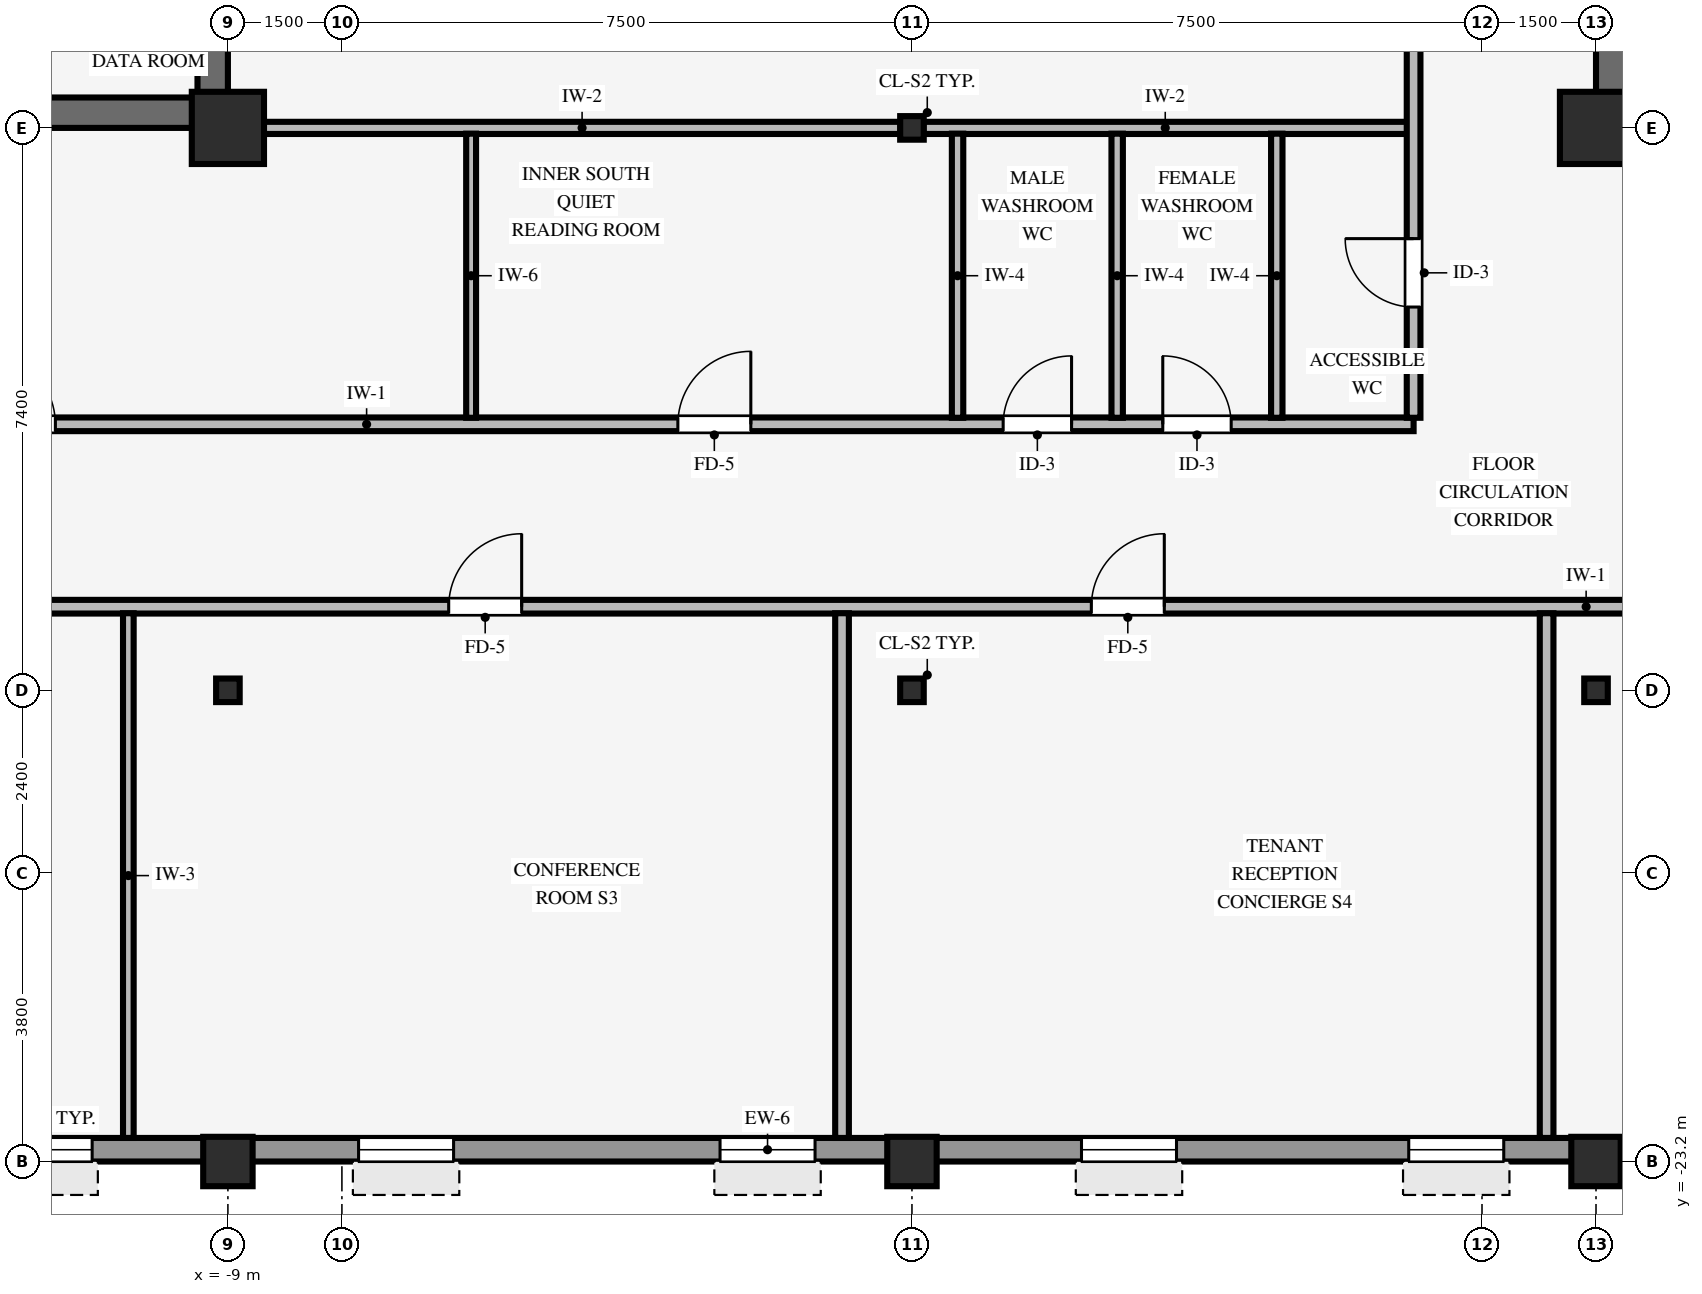
"""IFC4 building model, lengths in metres.
Left out: names, types, materials, properties, quantities, classifications, styles, units other than length and angle.
Written with IfcOpenShell. Run it as: python <this file> out.ifc"""

import sys

from ifc_helpers import new_model, si_unit, direction, frame, frame_2d, origin, origin_2d, place, context, subcontext, project, spatial, rectangle, hollow_rectangle, i_section, extrude, source, transform, mapped, element, fill, save


model = new_model("IFC4")
c1 = context("Model", 3, precision=1e-05, world=origin(), true_north=direction((0.0, 1.0)))
c2 = subcontext(c1, "Body", "Model", "MODEL_VIEW")
j1 = project(units=[si_unit("LENGTHUNIT", "METRE"), si_unit("PLANEANGLEUNIT", "RADIAN")], contexts=[c1])
p1 = place(None, origin())
s1 = spatial("IfcSite", under=j1, at=p1, CompositionType="ELEMENT")
p2 = place(p1, origin())
s2 = spatial("IfcBuilding", under=s1, at=p2, CompositionType="ELEMENT")
p3 = place(p2, frame((0.0, 0.0, 178.6)))
s3 = spatial("IfcBuildingStorey", under=s2, at=p3, CompositionType="ELEMENT", Elevation=178.6)
p4 = place(p3, frame((-17.5, -9.4, 0.0), z_axis=(0.0, 0.0, 1.0), x_axis=(1.0, 0.0, 0.0)))
e1 = element("IfcWall", 1, at=p4, inside=s3, PredefinedType="SHEAR", context=c2, shape_type="SweptSolid", body=[
    extrude(rectangle(XDim=8.5, YDim=0.4, at=frame_2d((4.25, 0.0))), origin(), (0.0, 0.0, 1.0), 3.37),
])
p5 = place(p3, frame((-9.2, -9.205, 0.0), z_axis=(0.0, 0.0, 1.0), x_axis=(0.0, 1.0, 0.0)))
e2 = element("IfcWall", 2, at=p5, inside=s3, PredefinedType="SHEAR", context=c2, shape_type="SweptSolid", body=[
    extrude(rectangle(XDim=18.41, YDim=0.4, at=frame_2d((9.205, 0.0))), origin(), (0.0, 0.0, 1.0), 3.37),
])
p6 = place(p5, frame((8.605, 0.0, 0.0)))
e3 = element("IfcOpeningElement", 3, at=p6, cuts=e2, PredefinedType="OPENING", context=c2, shape_type="SweptSolid", body=[
    extrude(rectangle(XDim=1.2, YDim=2.15, at=frame_2d((0.6, 1.075))), frame((0.0, 0.21, 0.0), z_axis=(0.0, -1.0, 0.0), x_axis=(1.0, 0.0, 0.0)), (0.0, 0.0, 1.0), 0.42),
])
p7 = place(p3, frame((9.0, -9.4, 0.0), z_axis=(0.0, 0.0, 1.0), x_axis=(1.0, 0.0, 0.0)))
e4 = element("IfcWall", 4, at=p7, inside=s3, PredefinedType="SHEAR", context=c2, shape_type="SweptSolid", body=[
    extrude(rectangle(XDim=8.5, YDim=0.4, at=frame_2d((4.25, 0.0))), origin(), (0.0, 0.0, 1.0), 3.37),
])
p8 = place(p3, frame((9.2, -9.205, 0.0), z_axis=(0.0, 0.0, 1.0), x_axis=(0.0, 1.0, 0.0)))
e5 = element("IfcWall", 5, at=p8, inside=s3, PredefinedType="SHEAR", context=c2, shape_type="SweptSolid", body=[
    extrude(rectangle(XDim=18.41, YDim=0.4, at=frame_2d((9.205, 0.0))), origin(), (0.0, 0.0, 1.0), 3.37),
])
p9 = place(p8, frame((8.605, 0.0, 0.0)))
e6 = element("IfcOpeningElement", 6, at=p9, cuts=e5, PredefinedType="OPENING", context=c2, shape_type="SweptSolid", body=[
    extrude(rectangle(XDim=1.2, YDim=2.15, at=frame_2d((0.6, 1.075))), frame((0.0, 0.21, 0.0), z_axis=(0.0, -1.0, 0.0), x_axis=(1.0, 0.0, 0.0)), (0.0, 0.0, 1.0), 0.42),
])
for number, where, z_axis, x_axis in (
    (7, (-9.0, -9.6, 0.0), (0.0, 0.0, 1.0), (1.0, 0.0, 0.0)),
    (8, (9.0, -9.6, 0.0), (0.0, 0.0, 1.0), (1.0, 0.0, 0.0)),
):
    element("IfcColumn", number, at=place(p3, frame(where, z_axis=z_axis, x_axis=x_axis)), inside=s3, PredefinedType="COLUMN", context=c2, shape_type="SweptSolid", body=[
        extrude(rectangle(XDim=0.95, YDim=0.95, at=origin_2d()), origin(), (0.0, 0.0, 1.0), 3.37),
    ])
for number, where, z_axis, x_axis in (
    (9, (-9.0, -23.2, 0.0), (0.0, 0.0, 1.0), (1.0, 0.0, 0.0)),
    (10, (0.0, -23.2, 0.0), (0.0, 0.0, 1.0), (1.0, 0.0, 0.0)),
    (11, (9.0, -23.2, 0.0), (0.0, 0.0, 1.0), (1.0, 0.0, 0.0)),
):
    element("IfcColumn", number, at=place(p3, frame(where, z_axis=z_axis, x_axis=x_axis)), inside=s3, PredefinedType="COLUMN", context=c2, shape_type="SweptSolid", body=[
        extrude(hollow_rectangle(XDim=0.65, YDim=0.65, WallThickness=0.04, InnerFilletRadius=0.04, OuterFilletRadius=0.08, at=origin_2d()), origin(), (0.0, 0.0, 1.0), 3.37),
    ])
for number, where, z_axis, x_axis in (
    (12, (0.0, -17.0, 0.0), (0.0, 0.0, 1.0), (1.0, 0.0, 0.0)),
    (13, (0.0, -9.6, 0.0), (0.0, 0.0, 1.0), (1.0, 0.0, 0.0)),
    (14, (-9.0, -17.0, 0.0), (0.0, 0.0, 1.0), (1.0, 0.0, 0.0)),
    (15, (9.0, -17.0, 0.0), (0.0, 0.0, 1.0), (1.0, 0.0, 0.0)),
):
    element("IfcColumn", number, at=place(p3, frame(where, z_axis=z_axis, x_axis=x_axis)), inside=s3, PredefinedType="COLUMN", context=c2, shape_type="SweptSolid", body=[
        extrude(i_section(OverallWidth=0.31, OverallDepth=0.31, WebThickness=0.015, FlangeThickness=0.015, FilletRadius=0.015, at=origin_2d()), origin(), (0.0, 0.0, 1.0), 3.37),
    ])
p10 = place(p3, frame((-24.3, -23.045, 0.0), z_axis=(0.0, 0.0, 1.0), x_axis=(1.0, 0.0, 0.0)))
e16 = element("IfcWall", 16, at=p10, inside=s3, PredefinedType="STANDARD", context=c2, shape_type="SweptSolid", body=[
    extrude(rectangle(XDim=44.8, YDim=0.31, at=frame_2d((22.4, 0.0))), origin(), (0.0, 0.0, 1.0), 2.705),
])
p11 = place(p10, frame((2.753, 0.0, 0.8)))
e17 = element("IfcOpeningElement", 17, at=p11, cuts=e16, PredefinedType="OPENING", context=c2, shape_type="SweptSolid", body=[
    extrude(rectangle(XDim=1.25, YDim=1.52, at=frame_2d((0.625, 0.76))), frame((0.0, 0.165, 0.0), z_axis=(0.0, -1.0, 0.0), x_axis=(1.0, 0.0, 0.0)), (0.0, 0.0, 1.0), 0.33),
])
p12 = place(p10, frame((7.508, 0.0, 0.8)))
e18 = element("IfcOpeningElement", 18, at=p12, cuts=e16, PredefinedType="OPENING", context=c2, shape_type="SweptSolid", body=[
    extrude(rectangle(XDim=1.25, YDim=1.52, at=frame_2d((0.625, 0.76))), frame((0.0, 0.165, 0.0), z_axis=(0.0, -1.0, 0.0), x_axis=(1.0, 0.0, 0.0)), (0.0, 0.0, 1.0), 0.33),
])
p13 = place(p10, frame((12.264, 0.0, 0.8)))
e19 = element("IfcOpeningElement", 19, at=p13, cuts=e16, PredefinedType="OPENING", context=c2, shape_type="SweptSolid", body=[
    extrude(rectangle(XDim=1.25, YDim=1.52, at=frame_2d((0.625, 0.76))), frame((0.0, 0.165, 0.0), z_axis=(0.0, -1.0, 0.0), x_axis=(1.0, 0.0, 0.0)), (0.0, 0.0, 1.0), 0.33),
])
p14 = place(p10, frame((17.019, 0.0, 0.8)))
e20 = element("IfcOpeningElement", 20, at=p14, cuts=e16, PredefinedType="OPENING", context=c2, shape_type="SweptSolid", body=[
    extrude(rectangle(XDim=1.25, YDim=1.52, at=frame_2d((0.625, 0.76))), frame((0.0, 0.165, 0.0), z_axis=(0.0, -1.0, 0.0), x_axis=(1.0, 0.0, 0.0)), (0.0, 0.0, 1.0), 0.33),
])
p15 = place(p10, frame((21.775, 0.0, 0.8)))
e21 = element("IfcOpeningElement", 21, at=p15, cuts=e16, PredefinedType="OPENING", context=c2, shape_type="SweptSolid", body=[
    extrude(rectangle(XDim=1.25, YDim=1.52, at=frame_2d((0.625, 0.76))), frame((0.0, 0.165, 0.0), z_axis=(0.0, -1.0, 0.0), x_axis=(1.0, 0.0, 0.0)), (0.0, 0.0, 1.0), 0.33),
])
p16 = place(p10, frame((26.531, 0.0, 0.8)))
e22 = element("IfcOpeningElement", 22, at=p16, cuts=e16, PredefinedType="OPENING", context=c2, shape_type="SweptSolid", body=[
    extrude(rectangle(XDim=1.25, YDim=1.52, at=frame_2d((0.625, 0.76))), frame((0.0, 0.165, 0.0), z_axis=(0.0, -1.0, 0.0), x_axis=(1.0, 0.0, 0.0)), (0.0, 0.0, 1.0), 0.33),
])
p17 = place(p10, frame((30.836, 0.0, 0.8)))
e23 = element("IfcOpeningElement", 23, at=p17, cuts=e16, PredefinedType="OPENING", context=c2, shape_type="SweptSolid", body=[
    extrude(rectangle(XDim=1.25, YDim=1.52, at=frame_2d((0.625, 0.76))), frame((0.0, 0.165, 0.0), z_axis=(0.0, -1.0, 0.0), x_axis=(1.0, 0.0, 0.0)), (0.0, 0.0, 1.0), 0.33),
])
p18 = place(p10, frame((36.042, 0.0, 0.8)))
e24 = element("IfcOpeningElement", 24, at=p18, cuts=e16, PredefinedType="OPENING", context=c2, shape_type="SweptSolid", body=[
    extrude(rectangle(XDim=1.25, YDim=1.52, at=frame_2d((0.625, 0.76))), frame((0.0, 0.165, 0.0), z_axis=(0.0, -1.0, 0.0), x_axis=(1.0, 0.0, 0.0)), (0.0, 0.0, 1.0), 0.33),
])
p19 = place(p10, frame((40.797, 0.0, 0.8)))
e25 = element("IfcOpeningElement", 25, at=p19, cuts=e16, PredefinedType="OPENING", context=c2, shape_type="SweptSolid", body=[
    extrude(rectangle(XDim=1.25, YDim=1.52, at=frame_2d((0.625, 0.76))), frame((0.0, 0.165, 0.0), z_axis=(0.0, -1.0, 0.0), x_axis=(1.0, 0.0, 0.0)), (0.0, 0.0, 1.0), 0.33),
])
p20 = place(p3, frame((-26.09, -15.9, 0.0), z_axis=(0.0, 0.0, 1.0), x_axis=(1.0, 0.0, 0.0)))
e26 = element("IfcWall", 26, at=p20, inside=s3, PredefinedType="PARTITIONING", context=c2, shape_type="SweptSolid", body=[
    extrude(rectangle(XDim=48.38, YDim=0.18, at=frame_2d((24.19, 0.0))), origin(), (0.0, 0.0, 1.0), 3.36),
])
p21 = place(p20, frame((40.51, 0.0, 0.0)))
e27 = element("IfcOpeningElement", 27, at=p21, cuts=e26, PredefinedType="OPENING", context=c2, shape_type="SweptSolid", body=[
    extrude(rectangle(XDim=0.96, YDim=2.1, at=frame_2d((0.48, 1.05))), frame((0.0, 0.1, 0.0), z_axis=(0.0, -1.0, 0.0), x_axis=(1.0, 0.0, 0.0)), (0.0, 0.0, 1.0), 0.2),
])
p22 = place(p20, frame((19.995, 0.0, 0.0)))
e28 = element("IfcOpeningElement", 28, at=p22, cuts=e26, PredefinedType="OPENING", context=c2, shape_type="SweptSolid", body=[
    extrude(rectangle(XDim=0.96, YDim=2.1, at=frame_2d((0.48, 1.05))), frame((0.0, 0.1, 0.0), z_axis=(0.0, -1.0, 0.0), x_axis=(1.0, 0.0, 0.0)), (0.0, 0.0, 1.0), 0.2),
])
p23 = place(p20, frame((28.45, 0.0, 0.0)))
e29 = element("IfcOpeningElement", 29, at=p23, cuts=e26, PredefinedType="OPENING", context=c2, shape_type="SweptSolid", body=[
    extrude(rectangle(XDim=0.96, YDim=2.1, at=frame_2d((0.48, 1.05))), frame((0.0, 0.1, 0.0), z_axis=(0.0, -1.0, 0.0), x_axis=(1.0, 0.0, 0.0)), (0.0, 0.0, 1.0), 0.2),
])
p24 = place(p20, frame((11.605, 0.0, 0.0)))
e30 = element("IfcOpeningElement", 30, at=p24, cuts=e26, PredefinedType="OPENING", context=c2, shape_type="SweptSolid", body=[
    extrude(rectangle(XDim=0.96, YDim=2.1, at=frame_2d((0.48, 1.05))), frame((0.0, 0.1, 0.0), z_axis=(0.0, -1.0, 0.0), x_axis=(1.0, 0.0, 0.0)), (0.0, 0.0, 1.0), 0.2),
])
p25 = place(p20, frame((2.465, 0.0, 0.0)))
e31 = element("IfcOpeningElement", 31, at=p25, cuts=e26, PredefinedType="OPENING", context=c2, shape_type="SweptSolid", body=[
    extrude(rectangle(XDim=0.96, YDim=2.1, at=frame_2d((0.48, 1.05))), frame((0.0, 0.1, 0.0), z_axis=(0.0, -1.0, 0.0), x_axis=(1.0, 0.0, 0.0)), (0.0, 0.0, 1.0), 0.2),
])
p26 = place(p3, frame((-17.7, -13.5, 0.0), z_axis=(0.0, 0.0, 1.0), x_axis=(1.0, 0.0, 0.0)))
e32 = element("IfcWall", 32, at=p26, inside=s3, PredefinedType="PARTITIONING", context=c2, shape_type="SweptSolid", body=[
    extrude(rectangle(XDim=24.3, YDim=0.18, at=frame_2d((12.15, 0.0))), origin(), (0.0, 0.0, 1.0), 3.008),
])
p27 = place(p26, frame((5.47, 0.0, 0.0)))
e33 = element("IfcOpeningElement", 33, at=p27, cuts=e32, PredefinedType="OPENING", context=c2, shape_type="SweptSolid", body=[
    extrude(rectangle(XDim=0.96, YDim=2.1, at=frame_2d((0.48, 1.05))), frame((0.0, 0.1, 0.0), z_axis=(0.0, -1.0, 0.0), x_axis=(1.0, 0.0, 0.0)), (0.0, 0.0, 1.0), 0.2),
])
p28 = place(p26, frame((14.62, 0.0, 0.0)))
e34 = element("IfcOpeningElement", 34, at=p28, cuts=e32, PredefinedType="OPENING", context=c2, shape_type="SweptSolid", body=[
    extrude(rectangle(XDim=0.96, YDim=2.1, at=frame_2d((0.48, 1.05))), frame((0.0, 0.1, 0.0), z_axis=(0.0, -1.0, 0.0), x_axis=(1.0, 0.0, 0.0)), (0.0, 0.0, 1.0), 0.2),
])
p29 = place(p26, frame((18.9, 0.0, 0.0)))
e35 = element("IfcOpeningElement", 35, at=p29, cuts=e32, PredefinedType="OPENING", context=c2, shape_type="SweptSolid", body=[
    extrude(rectangle(XDim=0.9, YDim=2.1, at=frame_2d((0.45, 1.05))), frame((0.0, 0.1, 0.0), z_axis=(0.0, -1.0, 0.0), x_axis=(1.0, 0.0, 0.0)), (0.0, 0.0, 1.0), 0.2),
])
p30 = place(p26, frame((21.0, 0.0, 0.0)))
e36 = element("IfcOpeningElement", 36, at=p30, cuts=e32, PredefinedType="OPENING", context=c2, shape_type="SweptSolid", body=[
    extrude(rectangle(XDim=0.9, YDim=2.1, at=frame_2d((0.45, 1.05))), frame((0.0, 0.1, 0.0), z_axis=(0.0, -1.0, 0.0), x_axis=(1.0, 0.0, 0.0)), (0.0, 0.0, 1.0), 0.2),
])
p31 = place(p3, frame((-8.529, -9.6, 0.0), z_axis=(0.0, 0.0, 1.0), x_axis=(1.0, 0.0, 0.0)))
e37 = element("IfcWall", 37, at=p31, inside=s3, PredefinedType="PARTITIONING", context=c2, shape_type="SweptSolid", body=[
    extrude(rectangle(XDim=8.378, YDim=0.16, at=frame_2d((4.189, 0.0))), origin(), (0.0, 0.0, 1.0), 2.405),
])
p32 = place(p3, frame((0.151, -9.6, 0.0), z_axis=(0.0, 0.0, 1.0), x_axis=(1.0, 0.0, 0.0)))
e38 = element("IfcWall", 38, at=p32, inside=s3, PredefinedType="PARTITIONING", context=c2, shape_type="SweptSolid", body=[
    extrude(rectangle(XDim=6.363, YDim=0.16, at=frame_2d((3.182, 0.0))), origin(), (0.0, 0.0, 1.0), 2.405),
])
p33 = place(p3, frame((-10.31, -22.89, 0.0), z_axis=(0.0, 0.0, 1.0), x_axis=(0.0, 1.0, 0.0)))
e39 = element("IfcWall", 39, at=p33, inside=s3, PredefinedType="PARTITIONING", context=c2, shape_type="SweptSolid", body=[
    extrude(rectangle(XDim=6.904, YDim=0.14, at=frame_2d((3.452, 0.0))), origin(), (0.0, 0.0, 1.0), 3.36),
])
p34 = place(p3, frame((-5.8, -13.414, 0.0), z_axis=(0.0, 0.0, 1.0), x_axis=(0.0, 1.0, 0.0)))
e40 = element("IfcWall", 40, at=p34, inside=s3, PredefinedType="PARTITIONING", context=c2, shape_type="SweptSolid", body=[
    extrude(rectangle(XDim=3.738, YDim=0.13, at=frame_2d((1.869, 0.0))), origin(), (0.0, 0.0, 1.0), 3.36),
])
p35 = place(p3, frame((-0.92, -22.89, 0.0), z_axis=(0.0, 0.0, 1.0), x_axis=(0.0, 1.0, 0.0)))
e41 = element("IfcWall", 41, at=p35, inside=s3, PredefinedType="PARTITIONING", context=c2, shape_type="SweptSolid", body=[
    extrude(rectangle(XDim=6.904, YDim=0.18, at=frame_2d((3.452, 0.0))), origin(), (0.0, 0.0, 1.0), 3.36),
])
for number, where, z_axis, x_axis in (
    (42, (0.6, -13.414, 0.0), (0.0, 0.0, 1.0), (0.0, 1.0, 0.0)),
    (43, (2.7, -13.414, 0.0), (0.0, 0.0, 1.0), (0.0, 1.0, 0.0)),
    (44, (4.8, -13.414, 0.0), (0.0, 0.0, 1.0), (0.0, 1.0, 0.0)),
):
    element("IfcWall", number, at=place(p3, frame(where, z_axis=z_axis, x_axis=x_axis)), inside=s3, PredefinedType="PARTITIONING", context=c2, shape_type="SweptSolid", body=[
        extrude(rectangle(XDim=3.738, YDim=0.15, at=frame_2d((1.869, 0.0))), origin(), (0.0, 0.0, 1.0), 3.36),
    ])
p36 = place(p3, frame((6.6, -13.414, 0.0), z_axis=(0.0, 0.0, 1.0), x_axis=(0.0, 1.0, 0.0)))
e45 = element("IfcWall", 45, at=p36, inside=s3, PredefinedType="PARTITIONING", context=c2, shape_type="SweptSolid", body=[
    extrude(rectangle(XDim=12.078, YDim=0.18, at=frame_2d((6.039, 0.0))), origin(), (0.0, 0.0, 1.0), 3.36),
])
p37 = place(p36, frame((1.457, 0.0, 0.0)))
e46 = element("IfcOpeningElement", 46, at=p37, cuts=e45, PredefinedType="OPENING", context=c2, shape_type="SweptSolid", body=[
    extrude(rectangle(XDim=0.9, YDim=2.1, at=frame_2d((0.45, 1.05))), frame((0.0, 0.1, 0.0), z_axis=(0.0, -1.0, 0.0), x_axis=(1.0, 0.0, 0.0)), (0.0, 0.0, 1.0), 0.2),
])
p38 = place(p3, frame((8.35, -22.89, 0.0), z_axis=(0.0, 0.0, 1.0), x_axis=(0.0, 1.0, 0.0)))
e47 = element("IfcWall", 47, at=p38, inside=s3, PredefinedType="PARTITIONING", context=c2, shape_type="SweptSolid", body=[
    extrude(rectangle(XDim=6.904, YDim=0.18, at=frame_2d((3.452, 0.0))), origin(), (0.0, 0.0, 1.0), 3.36),
])
m1 = source(origin(), c2, "Body", "SweptSolid", [
    extrude(rectangle(XDim=1.25, YDim=1.52, at=frame_2d((0.625, 0.76))), frame((0.0, 0.03, 0.0), z_axis=(0.0, -1.0, 0.0), x_axis=(1.0, 0.0, 0.0)), (0.0, 0.0, 1.0), 0.06),
])
p39 = place(p13, origin())
e48 = element("IfcWindow", 48, at=p39, inside=s3, PartitioningType="SINGLE_PANEL", PredefinedType="WINDOW", context=c2, shape_type="MappedRepresentation", body=[
    mapped(m1, transform((0.0, 0.0, 0.0), scale=1.0)),
])
fill(e19, e48)
p40 = place(p14, origin())
e49 = element("IfcWindow", 49, at=p40, inside=s3, PartitioningType="SINGLE_PANEL", PredefinedType="WINDOW", context=c2, shape_type="MappedRepresentation", body=[
    mapped(m1, transform((0.0, 0.0, 0.0), scale=1.0)),
])
fill(e20, e49)
p41 = place(p15, origin())
e50 = element("IfcWindow", 50, at=p41, inside=s3, PartitioningType="SINGLE_PANEL", PredefinedType="WINDOW", context=c2, shape_type="MappedRepresentation", body=[
    mapped(m1, transform((0.0, 0.0, 0.0), scale=1.0)),
])
fill(e21, e50)
p42 = place(p16, origin())
e51 = element("IfcWindow", 51, at=p42, inside=s3, PartitioningType="SINGLE_PANEL", PredefinedType="WINDOW", context=c2, shape_type="MappedRepresentation", body=[
    mapped(m1, transform((0.0, 0.0, 0.0), scale=1.0)),
])
fill(e22, e51)
p43 = place(p17, origin())
e52 = element("IfcWindow", 52, at=p43, inside=s3, PartitioningType="SINGLE_PANEL", PredefinedType="WINDOW", context=c2, shape_type="MappedRepresentation", body=[
    mapped(m1, transform((0.0, 0.0, 0.0), scale=1.0)),
])
fill(e23, e52)
m2 = source(origin(), c2, "Body", "SweptSolid", [
    extrude(rectangle(XDim=0.96, YDim=2.1, at=frame_2d((0.48, 1.05))), frame((0.0, 0.025, 0.0), z_axis=(0.0, -1.0, 0.0), x_axis=(1.0, 0.0, 0.0)), (0.0, 0.0, 1.0), 0.05),
])
p44 = place(p27, origin())
e53 = element("IfcDoor", 53, at=p44, inside=s3, OperationType="SINGLE_SWING_LEFT", PredefinedType="DOOR", context=c2, shape_type="MappedRepresentation", body=[
    mapped(m2, transform((0.0, 0.0, 0.0), scale=1.0)),
])
fill(e33, e53)
p45 = place(p22, origin())
e54 = element("IfcDoor", 54, at=p45, inside=s3, OperationType="SINGLE_SWING_RIGHT", PredefinedType="DOOR", context=c2, shape_type="MappedRepresentation", body=[
    mapped(m2, transform((0.0, 0.0, 0.0), scale=1.0)),
])
fill(e28, e54)
p46 = place(p23, origin())
e55 = element("IfcDoor", 55, at=p46, inside=s3, OperationType="SINGLE_SWING_RIGHT", PredefinedType="DOOR", context=c2, shape_type="MappedRepresentation", body=[
    mapped(m2, transform((0.0, 0.0, 0.0), scale=1.0)),
])
fill(e29, e55)
p47 = place(p28, origin())
e56 = element("IfcDoor", 56, at=p47, inside=s3, OperationType="SINGLE_SWING_RIGHT", PredefinedType="DOOR", context=c2, shape_type="MappedRepresentation", body=[
    mapped(m2, transform((0.0, 0.0, 0.0), scale=1.0)),
])
fill(e34, e56)
m3 = source(origin(), c2, "Body", "SweptSolid", [
    extrude(rectangle(XDim=0.9, YDim=2.1, at=frame_2d((0.45, 1.05))), frame((0.0, 0.025, 0.0), z_axis=(0.0, -1.0, 0.0), x_axis=(1.0, 0.0, 0.0)), (0.0, 0.0, 1.0), 0.05),
])
p48 = place(p37, origin())
e57 = element("IfcDoor", 57, at=p48, inside=s3, OperationType="SINGLE_SWING_RIGHT", PredefinedType="DOOR", context=c2, shape_type="MappedRepresentation", body=[
    mapped(m3, transform((0.0, 0.0, 0.0), scale=1.0)),
])
fill(e46, e57)
p49 = place(p29, origin())
e58 = element("IfcDoor", 58, at=p49, inside=s3, OperationType="SINGLE_SWING_RIGHT", PredefinedType="DOOR", context=c2, shape_type="MappedRepresentation", body=[
    mapped(m3, transform((0.0, 0.0, 0.0), scale=1.0)),
])
fill(e35, e58)
p50 = place(p30, origin())
e59 = element("IfcDoor", 59, at=p50, inside=s3, OperationType="SINGLE_SWING_LEFT", PredefinedType="DOOR", context=c2, shape_type="MappedRepresentation", body=[
    mapped(m3, transform((0.0, 0.0, 0.0), scale=1.0)),
])
fill(e36, e59)
save(model, sys.argv[1])
